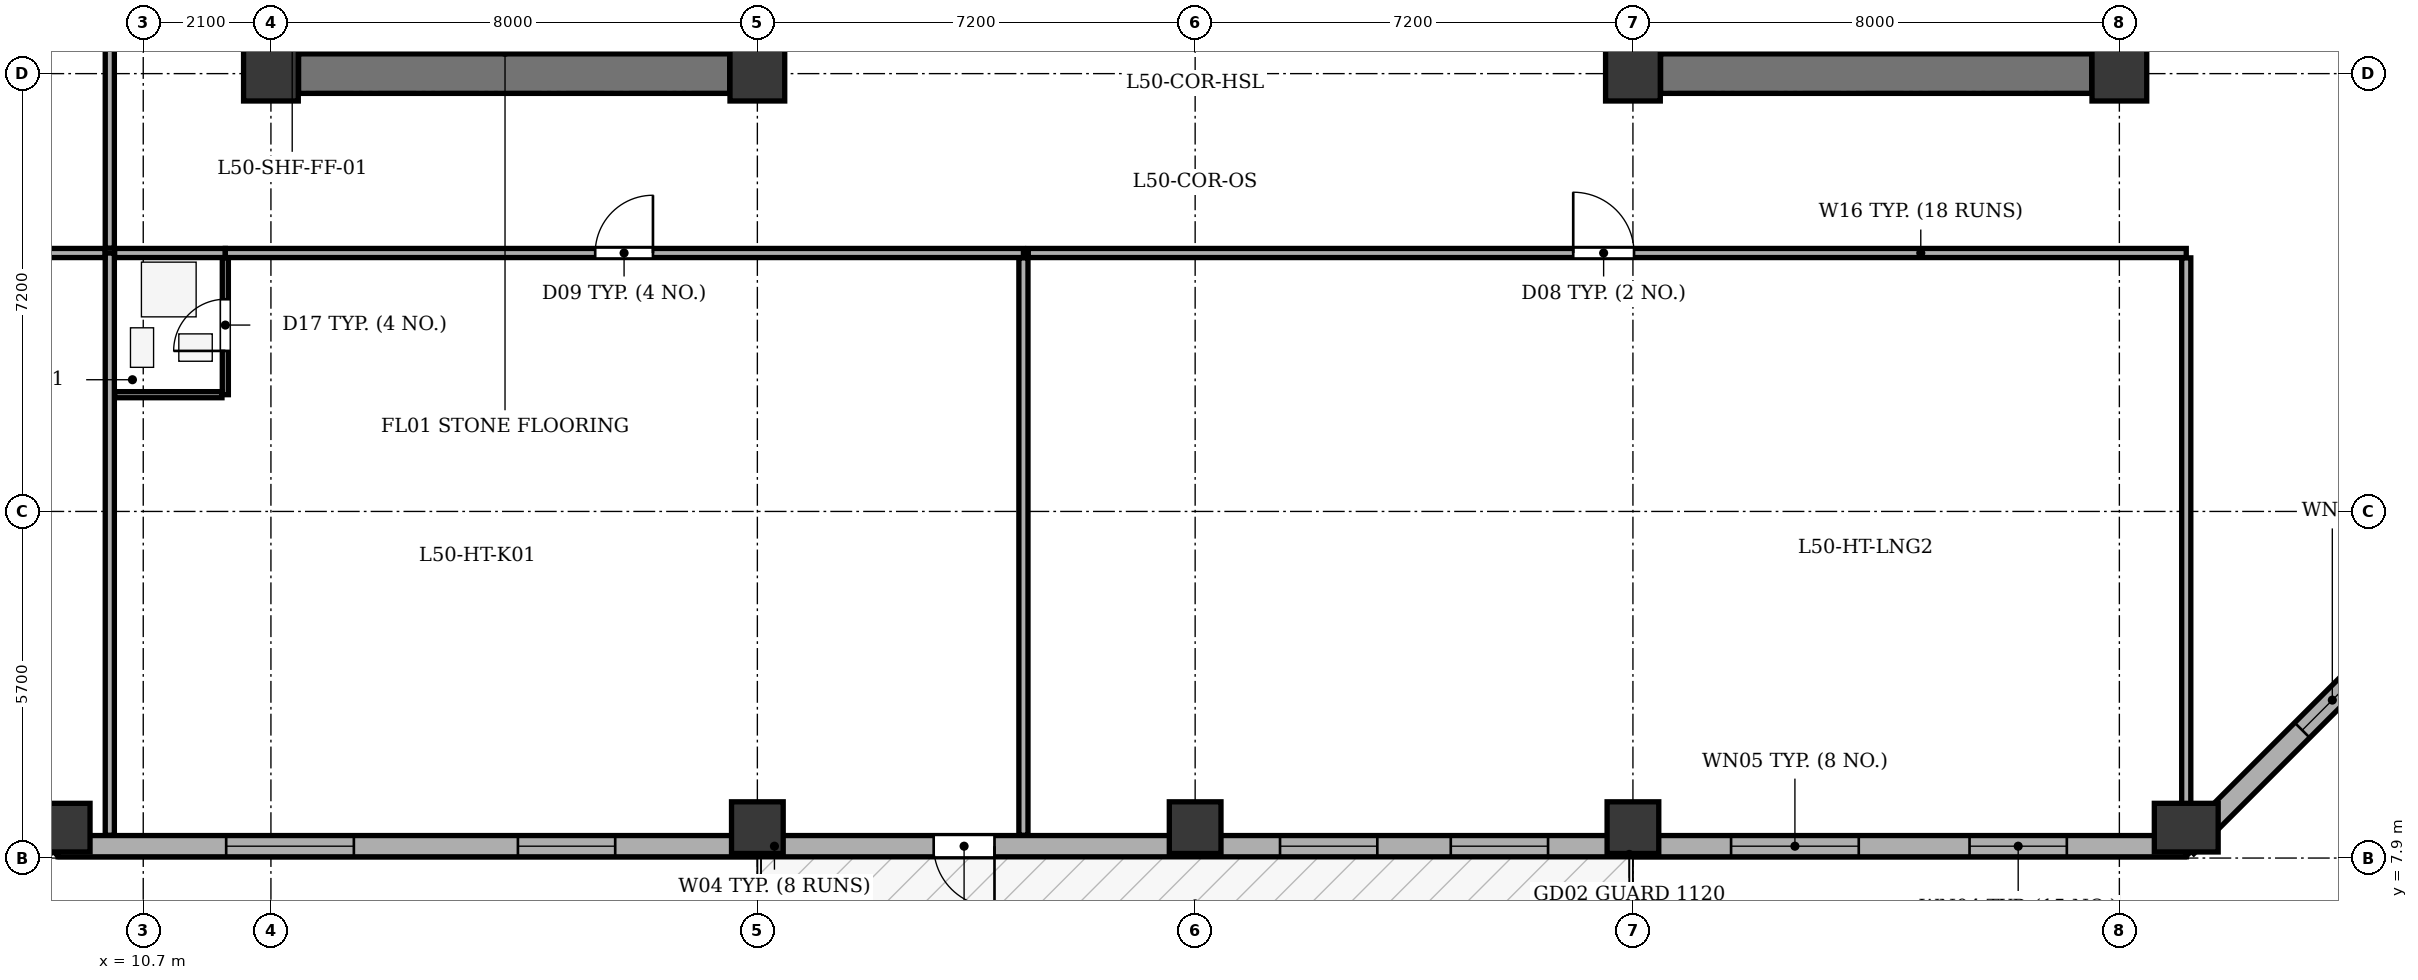
"""IFC4 building model, lengths in metres.
Left out: names, types, materials, properties, quantities, classifications, styles, units other than length and angle.
Written with IfcOpenShell. Run it as: python <this file> out.ifc"""

import sys

from ifc_helpers import new_model, si_unit, direction, frame, frame_2d, origin, origin_2d, place, context, subcontext, project, spatial, rectangle, extrude, element, fill, save


model = new_model("IFC4")
c1 = context("Model", 3, precision=1e-05, world=origin(), true_north=direction((0.0, 1.0)))
c2 = subcontext(c1, "Body", "Model", "MODEL_VIEW")
j1 = project(units=[si_unit("LENGTHUNIT", "METRE"), si_unit("PLANEANGLEUNIT", "RADIAN")], contexts=[c1])
p1 = place(None, origin())
s1 = spatial("IfcSite", under=j1, at=p1, CompositionType="ELEMENT")
p2 = place(p1, origin())
s2 = spatial("IfcBuilding", under=s1, at=p2, CompositionType="ELEMENT")
p3 = place(p2, frame((0.0, 0.0, 193.8)))
s3 = spatial("IfcBuildingStorey", under=s2, at=p3, CompositionType="ELEMENT", Elevation=193.8)
for number, where, z_axis, x_axis in (
    (1, (12.8, 20.8, 0.0), (0.0, 0.0, 1.0), (1.0, 0.0, 0.0)),
    (2, (20.8, 20.8, 0.0), (0.0, 0.0, 1.0), (1.0, 0.0, 0.0)),
    (3, (35.2, 20.8, 0.0), (0.0, 0.0, 1.0), (1.0, 0.0, 0.0)),
    (4, (43.2, 20.8, 0.0), (0.0, 0.0, 1.0), (1.0, 0.0, 0.0)),
):
    element("IfcColumn", number, at=place(p3, frame(where, z_axis=z_axis, x_axis=x_axis)), inside=s3, PredefinedType="COLUMN", context=c2, shape_type="SweptSolid", body=[
        extrude(rectangle(XDim=0.9, YDim=0.9, at=origin_2d()), origin(), (0.0, 0.0, 1.0), 3.5),
    ])
p4 = place(p3, frame((9.3, 8.4, 0.0), z_axis=(0.0, 0.0, 1.0), x_axis=(1.0, 0.0, 0.0)))
e5 = element("IfcColumn", 5, at=p4, inside=s3, PredefinedType="COLUMN", context=c2, shape_type="SweptSolid", body=[
    extrude(rectangle(XDim=0.8, YDim=1.05, at=origin_2d()), origin(), (0.0, 0.0, 1.0), 3.5),
])
for number, where, z_axis, x_axis in (
    (6, (20.8, 8.4, 0.0), (0.0, 0.0, 1.0), (1.0, 0.0, 0.0)),
    (7, (28.0, 8.4, 0.0), (0.0, 0.0, 1.0), (1.0, 0.0, 0.0)),
    (8, (35.2, 8.4, 0.0), (0.0, 0.0, 1.0), (1.0, 0.0, 0.0)),
):
    element("IfcColumn", number, at=place(p3, frame(where, z_axis=z_axis, x_axis=x_axis)), inside=s3, PredefinedType="COLUMN", context=c2, shape_type="SweptSolid", body=[
        extrude(rectangle(XDim=0.85, YDim=0.85, at=origin_2d()), origin(), (0.0, 0.0, 1.0), 3.5),
    ])
p5 = place(p3, frame((44.3, 8.4, 0.0), z_axis=(0.0, 0.0, 1.0), x_axis=(1.0, 0.0, 0.0)))
e9 = element("IfcColumn", 9, at=p5, inside=s3, PredefinedType="COLUMN", context=c2, shape_type="SweptSolid", body=[
    extrude(rectangle(XDim=0.8, YDim=1.05, at=origin_2d()), origin(), (0.0, 0.0, 1.0), 3.5),
])
p6 = place(p3, frame((44.3, 8.095, 0.0), z_axis=(0.0, 0.0, 1.0), x_axis=(-1.0, 0.0, 0.0)))
e10 = element("IfcWall", 10, at=p6, inside=s3, PredefinedType="STANDARD", context=c2, shape_type="SweptSolid", body=[
    extrude(rectangle(XDim=35.0, YDim=0.35, at=frame_2d((17.5, 0.0))), origin(), (0.0, 0.0, 1.0), 2.635),
])
p7 = place(p6, frame((19.6, 0.0, 0.0)))
e11 = element("IfcOpeningElement", 11, at=p7, cuts=e10, PredefinedType="OPENING", context=c2, shape_type="SweptSolid", body=[
    extrude(rectangle(XDim=1.0, YDim=2.02, at=frame_2d((0.5, 1.01))), frame((0.0, 0.185, 0.0), z_axis=(0.0, -1.0, 0.0), x_axis=(1.0, 0.0, 0.0)), (0.0, 0.0, 1.0), 0.37),
])
p8 = place(p6, frame((1.964, 0.0, 0.75)))
e12 = element("IfcOpeningElement", 12, at=p8, cuts=e10, PredefinedType="OPENING", context=c2, shape_type="SweptSolid", body=[
    extrude(rectangle(XDim=1.6, YDim=1.75, at=frame_2d((0.8, 0.875))), frame((0.0, 0.185, 0.0), z_axis=(0.0, -1.0, 0.0), x_axis=(1.0, 0.0, 0.0)), (0.0, 0.0, 1.0), 0.37),
])
p9 = place(p6, frame((5.386, 0.0, 0.75)))
e13 = element("IfcOpeningElement", 13, at=p9, cuts=e10, PredefinedType="OPENING", context=c2, shape_type="SweptSolid", body=[
    extrude(rectangle(XDim=2.1, YDim=1.75, at=frame_2d((1.05, 0.875))), frame((0.0, 0.185, 0.0), z_axis=(0.0, -1.0, 0.0), x_axis=(1.0, 0.0, 0.0)), (0.0, 0.0, 1.0), 0.37),
])
p10 = place(p6, frame((10.496, 0.0, 0.75)))
e14 = element("IfcOpeningElement", 14, at=p10, cuts=e10, PredefinedType="OPENING", context=c2, shape_type="SweptSolid", body=[
    extrude(rectangle(XDim=1.6, YDim=1.75, at=frame_2d((0.8, 0.875))), frame((0.0, 0.185, 0.0), z_axis=(0.0, -1.0, 0.0), x_axis=(1.0, 0.0, 0.0)), (0.0, 0.0, 1.0), 0.37),
])
p11 = place(p6, frame((13.304, 0.0, 0.75)))
e15 = element("IfcOpeningElement", 15, at=p11, cuts=e10, PredefinedType="OPENING", context=c2, shape_type="SweptSolid", body=[
    extrude(rectangle(XDim=1.6, YDim=1.75, at=frame_2d((0.8, 0.875))), frame((0.0, 0.185, 0.0), z_axis=(0.0, -1.0, 0.0), x_axis=(1.0, 0.0, 0.0)), (0.0, 0.0, 1.0), 0.37),
])
p12 = place(p6, frame((25.838, 0.0, 0.75)))
e16 = element("IfcOpeningElement", 16, at=p12, cuts=e10, PredefinedType="OPENING", context=c2, shape_type="SweptSolid", body=[
    extrude(rectangle(XDim=1.6, YDim=1.75, at=frame_2d((0.8, 0.875))), frame((0.0, 0.185, 0.0), z_axis=(0.0, -1.0, 0.0), x_axis=(1.0, 0.0, 0.0)), (0.0, 0.0, 1.0), 0.37),
])
p13 = place(p6, frame((30.136, 0.0, 0.75)))
e17 = element("IfcOpeningElement", 17, at=p13, cuts=e10, PredefinedType="OPENING", context=c2, shape_type="SweptSolid", body=[
    extrude(rectangle(XDim=2.1, YDim=1.75, at=frame_2d((1.05, 0.875))), frame((0.0, 0.185, 0.0), z_axis=(0.0, -1.0, 0.0), x_axis=(1.0, 0.0, 0.0)), (0.0, 0.0, 1.0), 0.37),
])
p14 = place(p3, frame((9.3, 8.095, 0.0), z_axis=(0.0, 0.0, 1.0), x_axis=(-0.707106781187, 0.707106781187, 0.0)))
e18 = element("IfcWall", 18, at=p14, inside=s3, PredefinedType="STANDARD", context=c2, shape_type="SweptSolid", body=[
    extrude(rectangle(XDim=6.795, YDim=0.35, at=frame_2d((3.397, 0.0))), origin(), (0.0, 0.0, 1.0), 2.635),
])
p15 = place(p14, frame((2.698, 0.0, 0.75)))
e19 = element("IfcOpeningElement", 19, at=p15, cuts=e18, PredefinedType="OPENING", context=c2, shape_type="SweptSolid", body=[
    extrude(rectangle(XDim=1.4, YDim=1.65, at=frame_2d((0.7, 0.825))), frame((0.0, 0.185, 0.0), z_axis=(0.0, -1.0, 0.0), x_axis=(1.0, 0.0, 0.0)), (0.0, 0.0, 1.0), 0.37),
])
p16 = place(p3, frame((49.105, 12.9, 0.0), z_axis=(0.0, 0.0, 1.0), x_axis=(-0.707106781187, -0.707106781187, 0.0)))
e20 = element("IfcWall", 20, at=p16, inside=s3, PredefinedType="STANDARD", context=c2, shape_type="SweptSolid", body=[
    extrude(rectangle(XDim=6.795, YDim=0.35, at=frame_2d((3.397, 0.0))), origin(), (0.0, 0.0, 1.0), 2.635),
])
p17 = place(p16, frame((2.698, 0.0, 0.75)))
e21 = element("IfcOpeningElement", 21, at=p17, cuts=e20, PredefinedType="OPENING", context=c2, shape_type="SweptSolid", body=[
    extrude(rectangle(XDim=1.4, YDim=1.65, at=frame_2d((0.7, 0.825))), frame((0.0, 0.185, 0.0), z_axis=(0.0, -1.0, 0.0), x_axis=(1.0, 0.0, 0.0)), (0.0, 0.0, 1.0), 0.37),
])
p18 = place(p3, frame((13.255, 20.8, 0.0), z_axis=(0.0, 0.0, 1.0), x_axis=(1.0, 0.0, 0.0)))
e22 = element("IfcWall", 22, at=p18, inside=s3, PredefinedType="SHEAR", context=c2, shape_type="SweptSolid", body=[
    extrude(rectangle(XDim=7.09, YDim=0.65, at=frame_2d((3.545, 0.0))), origin(), (0.0, 0.0, 1.0), 3.05),
])
p19 = place(p3, frame((16.435, 21.135, 0.0), z_axis=(0.0, 0.0, 1.0), x_axis=(0.0, 1.0, 0.0)))
e23 = element("IfcWall", 23, at=p19, inside=s3, PredefinedType="SHEAR", context=c2, shape_type="SweptSolid", body=[
    extrude(rectangle(XDim=12.13, YDim=0.25, at=frame_2d((6.065, 0.0))), origin(), (0.0, 0.0, 1.0), 3.05),
])
p20 = place(p19, frame((0.515, 0.0, 0.0)))
e24 = element("IfcOpeningElement", 24, at=p20, cuts=e23, PredefinedType="OPENING", context=c2, shape_type="SweptSolid", body=[
    extrude(rectangle(XDim=1.2, YDim=2.15, at=frame_2d((0.6, 1.075))), frame((0.0, 0.135, 0.0), z_axis=(0.0, -1.0, 0.0), x_axis=(1.0, 0.0, 0.0)), (0.0, 0.0, 1.0), 0.27),
])
p21 = place(p19, frame((2.665, 0.0, 0.0)))
e25 = element("IfcOpeningElement", 25, at=p21, cuts=e23, PredefinedType="OPENING", context=c2, shape_type="SweptSolid", body=[
    extrude(rectangle(XDim=1.15, YDim=2.15, at=frame_2d((0.575, 1.075))), frame((0.0, 0.135, 0.0), z_axis=(0.0, -1.0, 0.0), x_axis=(1.0, 0.0, 0.0)), (0.0, 0.0, 1.0), 0.27),
])
p22 = place(p3, frame((35.655, 20.8, 0.0), z_axis=(0.0, 0.0, 1.0), x_axis=(1.0, 0.0, 0.0)))
e26 = element("IfcWall", 26, at=p22, inside=s3, PredefinedType="SHEAR", context=c2, shape_type="SweptSolid", body=[
    extrude(rectangle(XDim=7.09, YDim=0.65, at=frame_2d((3.545, 0.0))), origin(), (0.0, 0.0, 1.0), 3.05),
])
p23 = place(p3, frame((39.565, 21.135, 0.0), z_axis=(0.0, 0.0, 1.0), x_axis=(0.0, 1.0, 0.0)))
e27 = element("IfcWall", 27, at=p23, inside=s3, PredefinedType="SHEAR", context=c2, shape_type="SweptSolid", body=[
    extrude(rectangle(XDim=12.13, YDim=0.25, at=frame_2d((6.065, 0.0))), origin(), (0.0, 0.0, 1.0), 3.05),
])
p24 = place(p23, frame((0.515, 0.0, 0.0)))
e28 = element("IfcOpeningElement", 28, at=p24, cuts=e27, PredefinedType="OPENING", context=c2, shape_type="SweptSolid", body=[
    extrude(rectangle(XDim=1.2, YDim=2.15, at=frame_2d((0.6, 1.075))), frame((0.0, 0.135, 0.0), z_axis=(0.0, -1.0, 0.0), x_axis=(1.0, 0.0, 0.0)), (0.0, 0.0, 1.0), 0.27),
])
p25 = place(p23, frame((2.665, 0.0, 0.0)))
e29 = element("IfcOpeningElement", 29, at=p25, cuts=e27, PredefinedType="OPENING", context=c2, shape_type="SweptSolid", body=[
    extrude(rectangle(XDim=1.15, YDim=2.15, at=frame_2d((0.575, 1.075))), frame((0.0, 0.135, 0.0), z_axis=(0.0, -1.0, 0.0), x_axis=(1.0, 0.0, 0.0)), (0.0, 0.0, 1.0), 0.27),
])
p26 = place(p3, frame((10.15, 8.275, 0.0), z_axis=(0.0, 0.0, 1.0), x_axis=(0.0, 1.0, 0.0)))
e30 = element("IfcWall", 30, at=p26, inside=s3, PredefinedType="PARTITIONING", context=c2, shape_type="SweptSolid", body=[
    extrude(rectangle(XDim=9.575, YDim=0.15, at=frame_2d((4.788, 0.0))), origin(), (0.0, 0.0, 1.0), 3.05),
])
p27 = place(p3, frame((10.23, 17.85, 0.0), z_axis=(0.0, 0.0, 1.0), x_axis=(1.0, 0.0, 0.0)))
e31 = element("IfcWall", 31, at=p27, inside=s3, PredefinedType="PARTITIONING", context=c2, shape_type="SweptSolid", body=[
    extrude(rectangle(XDim=1.82, YDim=0.15, at=frame_2d((0.91, 0.0))), origin(), (0.0, 0.0, 1.0), 3.05),
])
p28 = place(p3, frame((12.05, 17.85, 0.0), z_axis=(0.0, 0.0, 1.0), x_axis=(1.0, 0.0, 0.0)))
e32 = element("IfcWall", 32, at=p28, inside=s3, PredefinedType="PARTITIONING", context=c2, shape_type="SweptSolid", body=[
    extrude(rectangle(XDim=13.126, YDim=0.15, at=frame_2d((6.563, 0.0))), origin(), (0.0, 0.0, 1.0), 3.05),
])
p29 = place(p28, frame((6.083, 0.0, 0.0)))
e33 = element("IfcOpeningElement", 33, at=p29, cuts=e32, PredefinedType="OPENING", context=c2, shape_type="SweptSolid", body=[
    extrude(rectangle(XDim=0.95, YDim=2.1, at=frame_2d((0.475, 1.05))), frame((0.0, 0.085, 0.0), z_axis=(0.0, -1.0, 0.0), x_axis=(1.0, 0.0, 0.0)), (0.0, 0.0, 1.0), 0.17),
])
p30 = place(p3, frame((12.05, 15.52, 0.0), z_axis=(0.0, 0.0, 1.0), x_axis=(0.0, 1.0, 0.0)))
e34 = element("IfcWall", 34, at=p30, inside=s3, PredefinedType="PARTITIONING", context=c2, shape_type="SweptSolid", body=[
    extrude(rectangle(XDim=2.25, YDim=0.1, at=frame_2d((1.125, 0.0))), origin(), (0.0, 0.0, 1.0), 3.05),
])
p31 = place(p30, frame((0.72, 0.0, 0.0)))
e35 = element("IfcOpeningElement", 35, at=p31, cuts=e34, PredefinedType="OPENING", context=c2, shape_type="SweptSolid", body=[
    extrude(rectangle(XDim=0.85, YDim=2.05, at=frame_2d((0.425, 1.025))), frame((0.0, 0.06, 0.0), z_axis=(0.0, -1.0, 0.0), x_axis=(1.0, 0.0, 0.0)), (0.0, 0.0, 1.0), 0.12),
])
p32 = place(p3, frame((10.23, 15.52, 0.0), z_axis=(0.0, 0.0, 1.0), x_axis=(1.0, 0.0, 0.0)))
e36 = element("IfcWall", 36, at=p32, inside=s3, PredefinedType="PARTITIONING", context=c2, shape_type="SweptSolid", body=[
    extrude(rectangle(XDim=1.765, YDim=0.1, at=frame_2d((0.883, 0.0))), origin(), (0.0, 0.0, 1.0), 3.05),
])
p33 = place(p3, frame((25.176, 8.275, 0.0), z_axis=(0.0, 0.0, 1.0), x_axis=(0.0, 1.0, 0.0)))
e37 = element("IfcWall", 37, at=p33, inside=s3, PredefinedType="PARTITIONING", context=c2, shape_type="SweptSolid", body=[
    extrude(rectangle(XDim=9.495, YDim=0.15, at=frame_2d((4.748, 0.0))), origin(), (0.0, 0.0, 1.0), 3.05),
])
p34 = place(p3, frame((25.256, 17.85, 0.0), z_axis=(0.0, 0.0, 1.0), x_axis=(1.0, 0.0, 0.0)))
e38 = element("IfcWall", 38, at=p34, inside=s3, PredefinedType="PARTITIONING", context=c2, shape_type="SweptSolid", body=[
    extrude(rectangle(XDim=19.044, YDim=0.15, at=frame_2d((9.522, 0.0))), origin(), (0.0, 0.0, 1.0), 3.05),
])
p35 = place(p34, frame((8.962, 0.0, 0.0)))
e39 = element("IfcOpeningElement", 39, at=p35, cuts=e38, PredefinedType="OPENING", context=c2, shape_type="SweptSolid", body=[
    extrude(rectangle(XDim=1.0, YDim=2.1, at=frame_2d((0.5, 1.05))), frame((0.0, 0.085, 0.0), z_axis=(0.0, -1.0, 0.0), x_axis=(1.0, 0.0, 0.0)), (0.0, 0.0, 1.0), 0.17),
])
p36 = place(p3, frame((44.3, 8.275, 0.0), z_axis=(0.0, 0.0, 1.0), x_axis=(0.0, 1.0, 0.0)))
e40 = element("IfcWall", 40, at=p36, inside=s3, PredefinedType="PARTITIONING", context=c2, shape_type="SweptSolid", body=[
    extrude(rectangle(XDim=9.495, YDim=0.15, at=frame_2d((4.748, 0.0))), origin(), (0.0, 0.0, 1.0), 3.05),
])
p37 = place(p3, frame((4.675, 17.85, 0.0), z_axis=(0.0, 0.0, 1.0), x_axis=(1.0, 0.0, 0.0)))
e41 = element("IfcWall", 41, at=p37, inside=s3, PredefinedType="PARTITIONING", context=c2, shape_type="SweptSolid", body=[
    extrude(rectangle(XDim=5.395, YDim=0.15, at=frame_2d((2.698, 0.0))), origin(), (0.0, 0.0, 1.0), 3.05),
])
p38 = place(p3, frame((10.15, 17.93, 0.0), z_axis=(0.0, 0.0, 1.0), x_axis=(0.0, 1.0, 0.0)))
e42 = element("IfcWall", 42, at=p38, inside=s3, PredefinedType="PARTITIONING", context=c2, shape_type="SweptSolid", body=[
    extrude(rectangle(XDim=18.54, YDim=0.15, at=frame_2d((9.27, 0.0))), origin(), (0.0, 0.0, 1.0), 3.05),
])
p39 = place(p38, frame((8.79, 0.0, 0.0)))
e43 = element("IfcOpeningElement", 43, at=p39, cuts=e42, PredefinedType="OPENING", context=c2, shape_type="SweptSolid", body=[
    extrude(rectangle(XDim=0.95, YDim=2.1, at=frame_2d((0.475, 1.05))), frame((0.0, 0.085, 0.0), z_axis=(0.0, -1.0, 0.0), x_axis=(1.0, 0.0, 0.0)), (0.0, 0.0, 1.0), 0.17),
])
p40 = place(p7, origin())
e44 = element("IfcDoor", 44, at=p40, inside=s3, OperationType="SINGLE_SWING_LEFT", PredefinedType="DOOR", context=c2, shape_type="SweptSolid", body=[
    extrude(rectangle(XDim=1.0, YDim=2.02, at=frame_2d((0.5, 1.01))), frame((0.0, 0.025, 0.0), z_axis=(0.0, -1.0, 0.0), x_axis=(1.0, 0.0, 0.0)), (0.0, 0.0, 1.0), 0.05),
])
fill(e11, e44)
p41 = place(p8, origin())
e45 = element("IfcWindow", 45, at=p41, inside=s3, PartitioningType="SINGLE_PANEL", PredefinedType="WINDOW", context=c2, shape_type="SweptSolid", body=[
    extrude(rectangle(XDim=1.6, YDim=1.75, at=frame_2d((0.8, 0.875))), frame((0.0, -0.01, 0.0), z_axis=(0.0, -1.0, 0.0), x_axis=(1.0, 0.0, 0.0)), (0.0, 0.0, 1.0), 0.06),
])
fill(e12, e45)
p42 = place(p9, origin())
e46 = element("IfcWindow", 46, at=p42, inside=s3, PartitioningType="SINGLE_PANEL", PredefinedType="WINDOW", context=c2, shape_type="SweptSolid", body=[
    extrude(rectangle(XDim=2.1, YDim=1.75, at=frame_2d((1.05, 0.875))), frame((0.0, -0.01, 0.0), z_axis=(0.0, -1.0, 0.0), x_axis=(1.0, 0.0, 0.0)), (0.0, 0.0, 1.0), 0.06),
])
fill(e13, e46)
p43 = place(p10, origin())
e47 = element("IfcWindow", 47, at=p43, inside=s3, PartitioningType="SINGLE_PANEL", PredefinedType="WINDOW", context=c2, shape_type="SweptSolid", body=[
    extrude(rectangle(XDim=1.6, YDim=1.75, at=frame_2d((0.8, 0.875))), frame((0.0, -0.01, 0.0), z_axis=(0.0, -1.0, 0.0), x_axis=(1.0, 0.0, 0.0)), (0.0, 0.0, 1.0), 0.06),
])
fill(e14, e47)
p44 = place(p11, origin())
e48 = element("IfcWindow", 48, at=p44, inside=s3, PartitioningType="SINGLE_PANEL", PredefinedType="WINDOW", context=c2, shape_type="SweptSolid", body=[
    extrude(rectangle(XDim=1.6, YDim=1.75, at=frame_2d((0.8, 0.875))), frame((0.0, -0.01, 0.0), z_axis=(0.0, -1.0, 0.0), x_axis=(1.0, 0.0, 0.0)), (0.0, 0.0, 1.0), 0.06),
])
fill(e15, e48)
p45 = place(p12, origin())
e49 = element("IfcWindow", 49, at=p45, inside=s3, PartitioningType="SINGLE_PANEL", PredefinedType="WINDOW", context=c2, shape_type="SweptSolid", body=[
    extrude(rectangle(XDim=1.6, YDim=1.75, at=frame_2d((0.8, 0.875))), frame((0.0, -0.01, 0.0), z_axis=(0.0, -1.0, 0.0), x_axis=(1.0, 0.0, 0.0)), (0.0, 0.0, 1.0), 0.06),
])
fill(e16, e49)
p46 = place(p13, origin())
e50 = element("IfcWindow", 50, at=p46, inside=s3, PartitioningType="SINGLE_PANEL", PredefinedType="WINDOW", context=c2, shape_type="SweptSolid", body=[
    extrude(rectangle(XDim=2.1, YDim=1.75, at=frame_2d((1.05, 0.875))), frame((0.0, -0.01, 0.0), z_axis=(0.0, -1.0, 0.0), x_axis=(1.0, 0.0, 0.0)), (0.0, 0.0, 1.0), 0.06),
])
fill(e17, e50)
p47 = place(p17, origin())
e51 = element("IfcWindow", 51, at=p47, inside=s3, PartitioningType="SINGLE_PANEL", PredefinedType="WINDOW", context=c2, shape_type="SweptSolid", body=[
    extrude(rectangle(XDim=1.4, YDim=1.65, at=frame_2d((0.7, 0.825))), frame((0.0, -0.01, 0.0), z_axis=(0.0, -1.0, 0.0), x_axis=(1.0, 0.0, 0.0)), (0.0, 0.0, 1.0), 0.06),
])
fill(e21, e51)
p48 = place(p31, origin())
e52 = element("IfcDoor", 52, at=p48, inside=s3, OperationType="SINGLE_SWING_LEFT", PredefinedType="DOOR", context=c2, shape_type="SweptSolid", body=[
    extrude(rectangle(XDim=0.85, YDim=2.05, at=frame_2d((0.425, 1.025))), frame((0.0, 0.025, 0.0), z_axis=(0.0, -1.0, 0.0), x_axis=(1.0, 0.0, 0.0)), (0.0, 0.0, 1.0), 0.05),
])
fill(e35, e52)
p49 = place(p29, origin())
e53 = element("IfcDoor", 53, at=p49, inside=s3, OperationType="SINGLE_SWING_RIGHT", PredefinedType="DOOR", context=c2, shape_type="SweptSolid", body=[
    extrude(rectangle(XDim=0.95, YDim=2.1, at=frame_2d((0.475, 1.05))), frame((0.0, 0.025, 0.0), z_axis=(0.0, -1.0, 0.0), x_axis=(1.0, 0.0, 0.0)), (0.0, 0.0, 1.0), 0.05),
])
fill(e33, e53)
p50 = place(p35, origin())
e54 = element("IfcDoor", 54, at=p50, inside=s3, OperationType="SINGLE_SWING_LEFT", PredefinedType="DOOR", context=c2, shape_type="SweptSolid", body=[
    extrude(rectangle(XDim=1.0, YDim=2.1, at=frame_2d((0.5, 1.05))), frame((0.0, 0.025, 0.0), z_axis=(0.0, -1.0, 0.0), x_axis=(1.0, 0.0, 0.0)), (0.0, 0.0, 1.0), 0.05),
])
fill(e39, e54)
save(model, sys.argv[1])
